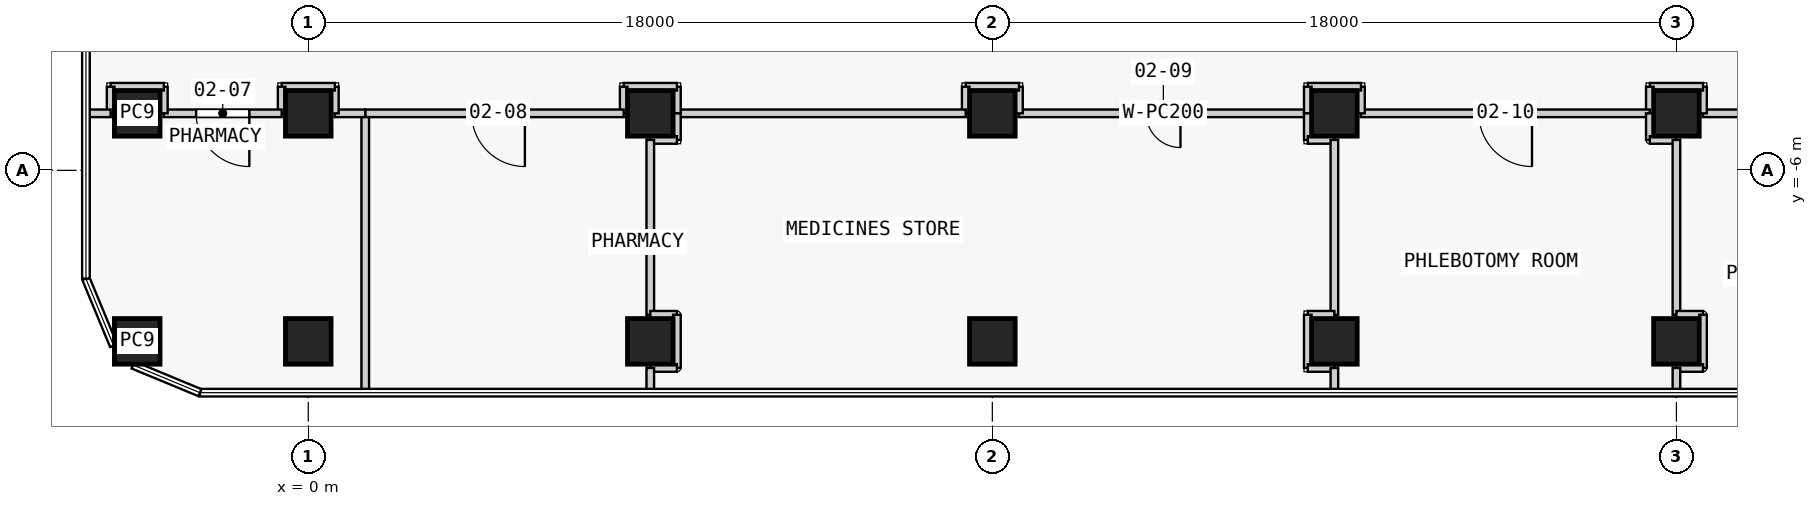
"""IFC4 building model, lengths in metres.
Left out: names, types, materials, properties, quantities, classifications, styles, units other than length and angle.
Written with IfcOpenShell. Run it as: python <this file> out.ifc"""

import sys

from ifc_helpers import new_model, si_unit, direction, frame, frame_2d, origin, origin_2d, place, context, subcontext, project, spatial, rectangle, extrude, element, fill, save


model = new_model("IFC4")
c1 = context("Model", 3, precision=1e-05, world=origin(), true_north=direction((0.0, 1.0)))
c2 = subcontext(c1, "Body", "Model", "MODEL_VIEW")
j1 = project(units=[si_unit("LENGTHUNIT", "METRE"), si_unit("PLANEANGLEUNIT", "RADIAN")], contexts=[c1])
p1 = place(None, origin())
s1 = spatial("IfcSite", under=j1, at=p1, CompositionType="ELEMENT")
p2 = place(p1, origin())
s2 = spatial("IfcBuilding", under=s1, at=p2, CompositionType="ELEMENT")
p3 = place(p2, frame((0.0, 0.0, 12.8)))
s3 = spatial("IfcBuildingStorey", under=s2, at=p3, CompositionType="ELEMENT", Elevation=12.8)
for number, where, z_axis, x_axis in (
    (1, (-4.5, -10.5, 0.0), (0.0, 0.0, 1.0), (1.0, 0.0, 0.0)),
    (2, (-4.5, -4.5, 0.0), (0.0, 0.0, 1.0), (1.0, 0.0, 0.0)),
    (3, (0.0, -10.5, 0.0), (0.0, 0.0, 1.0), (1.0, 0.0, 0.0)),
    (4, (0.0, -4.5, 0.0), (0.0, 0.0, 1.0), (1.0, 0.0, 0.0)),
    (5, (9.0, -10.5, 0.0), (0.0, 0.0, 1.0), (1.0, 0.0, 0.0)),
    (6, (9.0, -4.5, 0.0), (0.0, 0.0, 1.0), (1.0, 0.0, 0.0)),
    (7, (18.0, -10.5, 0.0), (0.0, 0.0, 1.0), (1.0, 0.0, 0.0)),
    (8, (18.0, -4.5, 0.0), (0.0, 0.0, 1.0), (1.0, 0.0, 0.0)),
    (9, (27.0, -10.5, 0.0), (0.0, 0.0, 1.0), (1.0, 0.0, 0.0)),
    (10, (27.0, -4.5, 0.0), (0.0, 0.0, 1.0), (1.0, 0.0, 0.0)),
    (11, (36.0, -10.5, 0.0), (0.0, 0.0, 1.0), (1.0, 0.0, 0.0)),
    (12, (36.0, -4.5, 0.0), (0.0, 0.0, 1.0), (1.0, 0.0, 0.0)),
):
    element("IfcColumn", number, at=place(p3, frame(where, z_axis=z_axis, x_axis=x_axis)), inside=s3, PredefinedType="COLUMN", context=c2, shape_type="SweptSolid", body=[
        extrude(rectangle(XDim=1.2, YDim=1.2, at=origin_2d()), origin(), (0.0, 0.0, 1.0), 4.5),
    ])
p4 = place(p3, frame((26.3, -4.5, 0.0), z_axis=(0.0, 0.0, 1.0), x_axis=(-1.0, 0.0, 0.0)))
e13 = element("IfcWall", 13, at=p4, inside=s3, PredefinedType="PARTITIONING", context=c2, shape_type="SweptSolid", body=[
    extrude(rectangle(XDim=7.6, YDim=0.2, at=frame_2d((3.8, 0.0))), origin(), (0.0, 0.0, 1.0), 3.45),
])
p5 = place(p4, frame((3.35, 0.0, 0.0)))
e14 = element("IfcOpeningElement", 14, at=p5, cuts=e13, PredefinedType="OPENING", context=c2, shape_type="SweptSolid", body=[
    extrude(rectangle(XDim=0.9, YDim=2.1, at=frame_2d((0.45, 1.05))), frame((0.0, 0.11, 0.0), z_axis=(0.0, -1.0, 0.0), x_axis=(1.0, 0.0, 0.0)), (0.0, 0.0, 1.0), 0.22),
])
p6 = place(p3, frame((18.7, -4.5, 0.0), z_axis=(0.0, 0.0, 1.0), x_axis=(0.0, 1.0, 0.0)))
e15 = element("IfcWall", 15, at=p6, inside=s3, PredefinedType="PARTITIONING", context=c2, shape_type="SweptSolid", body=[
    extrude(rectangle(XDim=0.7, YDim=0.2, at=frame_2d((0.35, 0.0))), origin(), (0.0, 0.0, 1.0), 3.45),
])
p7 = place(p3, frame((18.7, -3.8, 0.0), z_axis=(0.0, 0.0, 1.0), x_axis=(-1.0, 0.0, 0.0)))
e16 = element("IfcWall", 16, at=p7, inside=s3, PredefinedType="PARTITIONING", context=c2, shape_type="SweptSolid", body=[
    extrude(rectangle(XDim=1.4, YDim=0.2, at=frame_2d((0.7, 0.0))), origin(), (0.0, 0.0, 1.0), 4.15),
])
p8 = place(p3, frame((17.3, -3.8, 0.0), z_axis=(0.0, 0.0, 1.0), x_axis=(0.0, -1.0, 0.0)))
e17 = element("IfcWall", 17, at=p8, inside=s3, PredefinedType="PARTITIONING", context=c2, shape_type="SweptSolid", body=[
    extrude(rectangle(XDim=0.7, YDim=0.2, at=frame_2d((0.35, 0.0))), origin(), (0.0, 0.0, 1.0), 3.45),
])
p9 = place(p3, frame((17.3, -4.5, 0.0), z_axis=(0.0, 0.0, 1.0), x_axis=(-1.0, 0.0, 0.0)))
e18 = element("IfcWall", 18, at=p9, inside=s3, PredefinedType="PARTITIONING", context=c2, shape_type="SweptSolid", body=[
    extrude(rectangle(XDim=7.6, YDim=0.2, at=frame_2d((3.8, 0.0))), origin(), (0.0, 0.0, 1.0), 3.45),
])
p10 = place(p3, frame((44.3, -4.5, 0.0), z_axis=(0.0, 0.0, 1.0), x_axis=(-1.0, 0.0, 0.0)))
e19 = element("IfcWall", 19, at=p10, inside=s3, PredefinedType="PARTITIONING", context=c2, shape_type="SweptSolid", body=[
    extrude(rectangle(XDim=7.6, YDim=0.2, at=frame_2d((3.8, 0.0))), origin(), (0.0, 0.0, 1.0), 3.45),
])
p11 = place(p10, frame((3.1, 0.0, 0.0)))
e20 = element("IfcOpeningElement", 20, at=p11, cuts=e19, PredefinedType="OPENING", context=c2, shape_type="SweptSolid", body=[
    extrude(rectangle(XDim=1.4, YDim=2.1, at=frame_2d((0.7, 1.05))), frame((0.0, 0.11, 0.0), z_axis=(0.0, -1.0, 0.0), x_axis=(1.0, 0.0, 0.0)), (0.0, 0.0, 1.0), 0.22),
])
p12 = place(p3, frame((36.7, -4.5, 0.0), z_axis=(0.0, 0.0, 1.0), x_axis=(0.0, 1.0, 0.0)))
e21 = element("IfcWall", 21, at=p12, inside=s3, PredefinedType="PARTITIONING", context=c2, shape_type="SweptSolid", body=[
    extrude(rectangle(XDim=0.7, YDim=0.2, at=frame_2d((0.35, 0.0))), origin(), (0.0, 0.0, 1.0), 3.45),
])
p13 = place(p3, frame((36.7, -3.8, 0.0), z_axis=(0.0, 0.0, 1.0), x_axis=(-1.0, 0.0, 0.0)))
e22 = element("IfcWall", 22, at=p13, inside=s3, PredefinedType="PARTITIONING", context=c2, shape_type="SweptSolid", body=[
    extrude(rectangle(XDim=1.4, YDim=0.2, at=frame_2d((0.7, 0.0))), origin(), (0.0, 0.0, 1.0), 3.45),
])
p14 = place(p3, frame((35.3, -3.8, 0.0), z_axis=(0.0, 0.0, 1.0), x_axis=(0.0, -1.0, 0.0)))
e23 = element("IfcWall", 23, at=p14, inside=s3, PredefinedType="PARTITIONING", context=c2, shape_type="SweptSolid", body=[
    extrude(rectangle(XDim=0.7, YDim=0.2, at=frame_2d((0.35, 0.0))), origin(), (0.0, 0.0, 1.0), 3.45),
])
p15 = place(p3, frame((35.3, -4.5, 0.0), z_axis=(0.0, 0.0, 1.0), x_axis=(-1.0, 0.0, 0.0)))
e24 = element("IfcWall", 24, at=p15, inside=s3, PredefinedType="PARTITIONING", context=c2, shape_type="SweptSolid", body=[
    extrude(rectangle(XDim=7.6, YDim=0.2, at=frame_2d((3.8, 0.0))), origin(), (0.0, 0.0, 1.0), 3.45),
])
p16 = place(p15, frame((3.1, 0.0, 0.0)))
e25 = element("IfcOpeningElement", 25, at=p16, cuts=e24, PredefinedType="OPENING", context=c2, shape_type="SweptSolid", body=[
    extrude(rectangle(XDim=1.4, YDim=2.1, at=frame_2d((0.7, 1.05))), frame((0.0, 0.11, 0.0), z_axis=(0.0, -1.0, 0.0), x_axis=(1.0, 0.0, 0.0)), (0.0, 0.0, 1.0), 0.22),
])
p17 = place(p3, frame((27.7, -4.5, 0.0), z_axis=(0.0, 0.0, 1.0), x_axis=(0.0, 1.0, 0.0)))
e26 = element("IfcWall", 26, at=p17, inside=s3, PredefinedType="PARTITIONING", context=c2, shape_type="SweptSolid", body=[
    extrude(rectangle(XDim=0.7, YDim=0.2, at=frame_2d((0.35, 0.0))), origin(), (0.0, 0.0, 1.0), 3.45),
])
p18 = place(p3, frame((27.7, -3.8, 0.0), z_axis=(0.0, 0.0, 1.0), x_axis=(-1.0, 0.0, 0.0)))
e27 = element("IfcWall", 27, at=p18, inside=s3, PredefinedType="PARTITIONING", context=c2, shape_type="SweptSolid", body=[
    extrude(rectangle(XDim=1.4, YDim=0.2, at=frame_2d((0.7, 0.0))), origin(), (0.0, 0.0, 1.0), 3.45),
])
for number, where, z_axis, x_axis in (
    (28, (26.3, -3.8, 0.0), (0.0, 0.0, 1.0), (0.0, -1.0, 0.0)),
    (29, (9.7, -4.5, 0.0), (0.0, 0.0, 1.0), (0.0, 1.0, 0.0)),
):
    element("IfcWall", number, at=place(p3, frame(where, z_axis=z_axis, x_axis=x_axis)), inside=s3, PredefinedType="PARTITIONING", context=c2, shape_type="SweptSolid", body=[
        extrude(rectangle(XDim=0.7, YDim=0.2, at=frame_2d((0.35, 0.0))), origin(), (0.0, 0.0, 1.0), 3.45),
    ])
p19 = place(p3, frame((9.7, -3.8, 0.0), z_axis=(0.0, 0.0, 1.0), x_axis=(-1.0, 0.0, 0.0)))
e30 = element("IfcWall", 30, at=p19, inside=s3, PredefinedType="PARTITIONING", context=c2, shape_type="SweptSolid", body=[
    extrude(rectangle(XDim=1.4, YDim=0.2, at=frame_2d((0.7, 0.0))), origin(), (0.0, 0.0, 1.0), 4.15),
])
p20 = place(p3, frame((8.3, -3.8, 0.0), z_axis=(0.0, 0.0, 1.0), x_axis=(0.0, -1.0, 0.0)))
e31 = element("IfcWall", 31, at=p20, inside=s3, PredefinedType="PARTITIONING", context=c2, shape_type="SweptSolid", body=[
    extrude(rectangle(XDim=0.7, YDim=0.2, at=frame_2d((0.35, 0.0))), origin(), (0.0, 0.0, 1.0), 3.45),
])
p21 = place(p3, frame((8.3, -4.5, 0.0), z_axis=(0.0, 0.0, 1.0), x_axis=(-1.0, 0.0, 0.0)))
e32 = element("IfcWall", 32, at=p21, inside=s3, PredefinedType="PARTITIONING", context=c2, shape_type="SweptSolid", body=[
    extrude(rectangle(XDim=6.8, YDim=0.2, at=frame_2d((3.4, 0.0))), origin(), (0.0, 0.0, 1.0), 3.45),
])
p22 = place(p21, frame((2.6, 0.0, 0.0)))
e33 = element("IfcOpeningElement", 33, at=p22, cuts=e32, PredefinedType="OPENING", context=c2, shape_type="SweptSolid", body=[
    extrude(rectangle(XDim=1.4, YDim=2.1, at=frame_2d((0.7, 1.05))), frame((0.0, 0.11, 0.0), z_axis=(0.0, -1.0, 0.0), x_axis=(1.0, 0.0, 0.0)), (0.0, 0.0, 1.0), 0.22),
])
for number, where, z_axis, x_axis in (
    (34, (26.3, -4.5, 0.0), (0.0, 0.0, 1.0), (0.0, -1.0, 0.0)),
    (35, (26.3, -5.2, 0.0), (0.0, 0.0, 1.0), (1.0, 0.0, 0.0)),
):
    element("IfcWall", number, at=place(p3, frame(where, z_axis=z_axis, x_axis=x_axis)), inside=s3, PredefinedType="PARTITIONING", context=c2, shape_type="SweptSolid", body=[
        extrude(rectangle(XDim=0.7, YDim=0.2, at=frame_2d((0.35, 0.0))), origin(), (0.0, 0.0, 1.0), 3.45),
    ])
p23 = place(p3, frame((27.0, -5.2, 0.0), z_axis=(0.0, 0.0, 1.0), x_axis=(0.0, -1.0, 0.0)))
e36 = element("IfcWall", 36, at=p23, inside=s3, PredefinedType="PARTITIONING", context=c2, shape_type="SweptSolid", body=[
    extrude(rectangle(XDim=4.6, YDim=0.2, at=frame_2d((2.3, 0.0))), origin(), (0.0, 0.0, 1.0), 3.45),
])
p24 = place(p3, frame((27.0, -9.8, 0.0), z_axis=(0.0, 0.0, 1.0), x_axis=(-1.0, 0.0, 0.0)))
e37 = element("IfcWall", 37, at=p24, inside=s3, PredefinedType="PARTITIONING", context=c2, shape_type="SweptSolid", body=[
    extrude(rectangle(XDim=0.7, YDim=0.2, at=frame_2d((0.35, 0.0))), origin(), (0.0, 0.0, 1.0), 3.45),
])
p25 = place(p3, frame((26.3, -9.8, 0.0), z_axis=(0.0, 0.0, 1.0), x_axis=(0.0, -1.0, 0.0)))
e38 = element("IfcWall", 38, at=p25, inside=s3, PredefinedType="PARTITIONING", context=c2, shape_type="SweptSolid", body=[
    extrude(rectangle(XDim=1.4, YDim=0.2, at=frame_2d((0.7, 0.0))), origin(), (0.0, 0.0, 1.0), 3.45),
])
p26 = place(p3, frame((26.3, -11.2, 0.0), z_axis=(0.0, 0.0, 1.0), x_axis=(1.0, 0.0, 0.0)))
e39 = element("IfcWall", 39, at=p26, inside=s3, PredefinedType="PARTITIONING", context=c2, shape_type="SweptSolid", body=[
    extrude(rectangle(XDim=0.7, YDim=0.2, at=frame_2d((0.35, 0.0))), origin(), (0.0, 0.0, 1.0), 4.15),
])
p27 = place(p3, frame((27.0, -11.2, 0.0), z_axis=(0.0, 0.0, 1.0), x_axis=(0.0, -1.0, 0.0)))
e40 = element("IfcWall", 40, at=p27, inside=s3, PredefinedType="PARTITIONING", context=c2, shape_type="SweptSolid", body=[
    extrude(rectangle(XDim=0.65, YDim=0.2, at=frame_2d((0.325, 0.0))), origin(), (0.0, 0.0, 1.0), 4.15),
])
for number, where, z_axis, x_axis in (
    (41, (9.7, -4.5, 0.0), (0.0, 0.0, 1.0), (0.0, -1.0, 0.0)),
    (42, (9.7, -5.2, 0.0), (0.0, 0.0, 1.0), (-1.0, 0.0, 0.0)),
):
    element("IfcWall", number, at=place(p3, frame(where, z_axis=z_axis, x_axis=x_axis)), inside=s3, PredefinedType="PARTITIONING", context=c2, shape_type="SweptSolid", body=[
        extrude(rectangle(XDim=0.7, YDim=0.2, at=frame_2d((0.35, 0.0))), origin(), (0.0, 0.0, 1.0), 3.45),
    ])
p28 = place(p3, frame((9.0, -5.2, 0.0), z_axis=(0.0, 0.0, 1.0), x_axis=(0.0, -1.0, 0.0)))
e43 = element("IfcWall", 43, at=p28, inside=s3, PredefinedType="PARTITIONING", context=c2, shape_type="SweptSolid", body=[
    extrude(rectangle(XDim=4.6, YDim=0.2, at=frame_2d((2.3, 0.0))), origin(), (0.0, 0.0, 1.0), 3.45),
])
p29 = place(p3, frame((9.0, -9.8, 0.0), z_axis=(0.0, 0.0, 1.0), x_axis=(1.0, 0.0, 0.0)))
e44 = element("IfcWall", 44, at=p29, inside=s3, PredefinedType="PARTITIONING", context=c2, shape_type="SweptSolid", body=[
    extrude(rectangle(XDim=0.7, YDim=0.2, at=frame_2d((0.35, 0.0))), origin(), (0.0, 0.0, 1.0), 3.45),
])
p30 = place(p3, frame((9.7, -9.8, 0.0), z_axis=(0.0, 0.0, 1.0), x_axis=(0.0, -1.0, 0.0)))
e45 = element("IfcWall", 45, at=p30, inside=s3, PredefinedType="PARTITIONING", context=c2, shape_type="SweptSolid", body=[
    extrude(rectangle(XDim=1.4, YDim=0.2, at=frame_2d((0.7, 0.0))), origin(), (0.0, 0.0, 1.0), 3.45),
])
p31 = place(p3, frame((9.7, -11.2, 0.0), z_axis=(0.0, 0.0, 1.0), x_axis=(-1.0, 0.0, 0.0)))
e46 = element("IfcWall", 46, at=p31, inside=s3, PredefinedType="PARTITIONING", context=c2, shape_type="SweptSolid", body=[
    extrude(rectangle(XDim=0.7, YDim=0.2, at=frame_2d((0.35, 0.0))), origin(), (0.0, 0.0, 1.0), 4.15),
])
p32 = place(p3, frame((9.0, -11.2, 0.0), z_axis=(0.0, 0.0, 1.0), x_axis=(0.0, -1.0, 0.0)))
e47 = element("IfcWall", 47, at=p32, inside=s3, PredefinedType="PARTITIONING", context=c2, shape_type="SweptSolid", body=[
    extrude(rectangle(XDim=0.65, YDim=0.2, at=frame_2d((0.325, 0.0))), origin(), (0.0, 0.0, 1.0), 4.15),
])
for number, where, z_axis, x_axis in (
    (48, (35.3, -4.5, 0.0), (0.0, 0.0, 1.0), (0.0, -1.0, 0.0)),
    (49, (35.3, -5.2, 0.0), (0.0, 0.0, 1.0), (1.0, 0.0, 0.0)),
):
    element("IfcWall", number, at=place(p3, frame(where, z_axis=z_axis, x_axis=x_axis)), inside=s3, PredefinedType="PARTITIONING", context=c2, shape_type="SweptSolid", body=[
        extrude(rectangle(XDim=0.7, YDim=0.2, at=frame_2d((0.35, 0.0))), origin(), (0.0, 0.0, 1.0), 3.45),
    ])
p33 = place(p3, frame((36.0, -5.2, 0.0), z_axis=(0.0, 0.0, 1.0), x_axis=(0.0, -1.0, 0.0)))
e50 = element("IfcWall", 50, at=p33, inside=s3, PredefinedType="PARTITIONING", context=c2, shape_type="SweptSolid", body=[
    extrude(rectangle(XDim=4.6, YDim=0.2, at=frame_2d((2.3, 0.0))), origin(), (0.0, 0.0, 1.0), 3.45),
])
p34 = place(p3, frame((36.0, -9.8, 0.0), z_axis=(0.0, 0.0, 1.0), x_axis=(1.0, 0.0, 0.0)))
e51 = element("IfcWall", 51, at=p34, inside=s3, PredefinedType="PARTITIONING", context=c2, shape_type="SweptSolid", body=[
    extrude(rectangle(XDim=0.7, YDim=0.2, at=frame_2d((0.35, 0.0))), origin(), (0.0, 0.0, 1.0), 3.45),
])
p35 = place(p3, frame((36.7, -9.8, 0.0), z_axis=(0.0, 0.0, 1.0), x_axis=(0.0, -1.0, 0.0)))
e52 = element("IfcWall", 52, at=p35, inside=s3, PredefinedType="PARTITIONING", context=c2, shape_type="SweptSolid", body=[
    extrude(rectangle(XDim=1.4, YDim=0.2, at=frame_2d((0.7, 0.0))), origin(), (0.0, 0.0, 1.0), 3.45),
])
p36 = place(p3, frame((36.7, -11.2, 0.0), z_axis=(0.0, 0.0, 1.0), x_axis=(-1.0, 0.0, 0.0)))
e53 = element("IfcWall", 53, at=p36, inside=s3, PredefinedType="PARTITIONING", context=c2, shape_type="SweptSolid", body=[
    extrude(rectangle(XDim=0.7, YDim=0.2, at=frame_2d((0.35, 0.0))), origin(), (0.0, 0.0, 1.0), 4.15),
])
p37 = place(p3, frame((36.0, -11.2, 0.0), z_axis=(0.0, 0.0, 1.0), x_axis=(0.0, -1.0, 0.0)))
e54 = element("IfcWall", 54, at=p37, inside=s3, PredefinedType="PARTITIONING", context=c2, shape_type="SweptSolid", body=[
    extrude(rectangle(XDim=0.65, YDim=0.2, at=frame_2d((0.325, 0.0))), origin(), (0.0, 0.0, 1.0), 4.15),
])
p38 = place(p3, frame((1.5, -4.5, 0.0), z_axis=(0.0, 0.0, 1.0), x_axis=(-1.0, 0.0, 0.0)))
e55 = element("IfcWall", 55, at=p38, inside=s3, PredefinedType="PARTITIONING", context=c2, shape_type="SweptSolid", body=[
    extrude(rectangle(XDim=0.8, YDim=0.2, at=frame_2d((0.4, 0.0))), origin(), (0.0, 0.0, 1.0), 3.45),
])
p39 = place(p3, frame((0.7, -4.5, 0.0), z_axis=(0.0, 0.0, 1.0), x_axis=(0.0, 1.0, 0.0)))
e56 = element("IfcWall", 56, at=p39, inside=s3, PredefinedType="PARTITIONING", context=c2, shape_type="SweptSolid", body=[
    extrude(rectangle(XDim=0.7, YDim=0.2, at=frame_2d((0.35, 0.0))), origin(), (0.0, 0.0, 1.0), 3.45),
])
p40 = place(p3, frame((0.7, -3.8, 0.0), z_axis=(0.0, 0.0, 1.0), x_axis=(-1.0, 0.0, 0.0)))
e57 = element("IfcWall", 57, at=p40, inside=s3, PredefinedType="PARTITIONING", context=c2, shape_type="SweptSolid", body=[
    extrude(rectangle(XDim=1.4, YDim=0.2, at=frame_2d((0.7, 0.0))), origin(), (0.0, 0.0, 1.0), 4.15),
])
p41 = place(p3, frame((-0.7, -3.8, 0.0), z_axis=(0.0, 0.0, 1.0), x_axis=(0.0, -1.0, 0.0)))
e58 = element("IfcWall", 58, at=p41, inside=s3, PredefinedType="PARTITIONING", context=c2, shape_type="SweptSolid", body=[
    extrude(rectangle(XDim=0.7, YDim=0.2, at=frame_2d((0.35, 0.0))), origin(), (0.0, 0.0, 1.0), 3.45),
])
p42 = place(p3, frame((-0.7, -4.5, 0.0), z_axis=(0.0, 0.0, 1.0), x_axis=(-1.0, 0.0, 0.0)))
e59 = element("IfcWall", 59, at=p42, inside=s3, PredefinedType="PARTITIONING", context=c2, shape_type="SweptSolid", body=[
    extrude(rectangle(XDim=3.1, YDim=0.2, at=frame_2d((1.55, 0.0))), origin(), (0.0, 0.0, 1.0), 3.45),
])
p43 = place(p42, frame((0.85, 0.0, 0.0)))
e60 = element("IfcOpeningElement", 60, at=p43, cuts=e59, PredefinedType="OPENING", context=c2, shape_type="SweptSolid", body=[
    extrude(rectangle(XDim=1.4, YDim=2.1, at=frame_2d((0.7, 1.05))), frame((0.0, 0.11, 0.0), z_axis=(0.0, -1.0, 0.0), x_axis=(1.0, 0.0, 0.0)), (0.0, 0.0, 1.0), 0.22),
])
p44 = place(p3, frame((-3.8, -4.5, 0.0), z_axis=(0.0, 0.0, 1.0), x_axis=(0.0, 1.0, 0.0)))
e61 = element("IfcWall", 61, at=p44, inside=s3, PredefinedType="PARTITIONING", context=c2, shape_type="SweptSolid", body=[
    extrude(rectangle(XDim=0.7, YDim=0.2, at=frame_2d((0.35, 0.0))), origin(), (0.0, 0.0, 1.0), 3.45),
])
p45 = place(p3, frame((1.5, -4.6, 0.0), z_axis=(0.0, 0.0, 1.0), x_axis=(0.0, -1.0, 0.0)))
e62 = element("IfcWall", 62, at=p45, inside=s3, PredefinedType="PARTITIONING", context=c2, shape_type="SweptSolid", body=[
    extrude(rectangle(XDim=7.25, YDim=0.2, at=frame_2d((3.625, 0.0))), origin(), (0.0, 0.0, 1.0), 3.45),
])
p46 = place(p3, frame((-3.8, -3.8, 0.0), z_axis=(0.0, 0.0, 1.0), x_axis=(-1.0, 0.0, 0.0)))
e63 = element("IfcWall", 63, at=p46, inside=s3, PredefinedType="PARTITIONING", context=c2, shape_type="SweptSolid", body=[
    extrude(rectangle(XDim=1.4, YDim=0.2, at=frame_2d((0.7, 0.0))), origin(), (0.0, 0.0, 1.0), 3.45),
])
p47 = place(p3, frame((-5.2, -3.8, 0.0), z_axis=(0.0, 0.0, 1.0), x_axis=(0.0, -1.0, 0.0)))
e64 = element("IfcWall", 64, at=p47, inside=s3, PredefinedType="PARTITIONING", context=c2, shape_type="SweptSolid", body=[
    extrude(rectangle(XDim=0.7, YDim=0.2, at=frame_2d((0.35, 0.0))), origin(), (0.0, 0.0, 1.0), 4.15),
])
p48 = place(p3, frame((-5.2, -4.5, 0.0), z_axis=(0.0, 0.0, 1.0), x_axis=(-1.0, 0.0, 0.0)))
e65 = element("IfcWall", 65, at=p48, inside=s3, PredefinedType="PARTITIONING", context=c2, shape_type="SweptSolid", body=[
    extrude(rectangle(XDim=0.65, YDim=0.2, at=frame_2d((0.325, 0.0))), origin(), (0.0, 0.0, 1.0), 4.15),
])
p49 = place(p43, origin())
e66 = element("IfcDoor", 66, at=p49, inside=s3, OperationType="SINGLE_SWING_LEFT", PredefinedType="DOOR", context=c2, shape_type="SweptSolid", body=[
    extrude(rectangle(XDim=1.4, YDim=2.1, at=frame_2d((0.7, 1.05))), frame((0.0, 0.025, 0.0), z_axis=(0.0, -1.0, 0.0), x_axis=(1.0, 0.0, 0.0)), (0.0, 0.0, 1.0), 0.05),
])
fill(e60, e66)
p50 = place(p22, origin())
e67 = element("IfcDoor", 67, at=p50, inside=s3, OperationType="SINGLE_SWING_LEFT", PredefinedType="DOOR", context=c2, shape_type="SweptSolid", body=[
    extrude(rectangle(XDim=1.4, YDim=2.1, at=frame_2d((0.7, 1.05))), frame((0.0, 0.025, 0.0), z_axis=(0.0, -1.0, 0.0), x_axis=(1.0, 0.0, 0.0)), (0.0, 0.0, 1.0), 0.05),
])
fill(e33, e67)
p51 = place(p5, origin())
e68 = element("IfcDoor", 68, at=p51, inside=s3, OperationType="SINGLE_SWING_LEFT", PredefinedType="DOOR", context=c2, shape_type="SweptSolid", body=[
    extrude(rectangle(XDim=0.9, YDim=2.1, at=frame_2d((0.45, 1.05))), frame((0.0, 0.025, 0.0), z_axis=(0.0, -1.0, 0.0), x_axis=(1.0, 0.0, 0.0)), (0.0, 0.0, 1.0), 0.05),
])
fill(e14, e68)
p52 = place(p16, origin())
e69 = element("IfcDoor", 69, at=p52, inside=s3, OperationType="SINGLE_SWING_LEFT", PredefinedType="DOOR", context=c2, shape_type="SweptSolid", body=[
    extrude(rectangle(XDim=1.4, YDim=2.1, at=frame_2d((0.7, 1.05))), frame((0.0, 0.025, 0.0), z_axis=(0.0, -1.0, 0.0), x_axis=(1.0, 0.0, 0.0)), (0.0, 0.0, 1.0), 0.05),
])
fill(e25, e69)
save(model, sys.argv[1])
